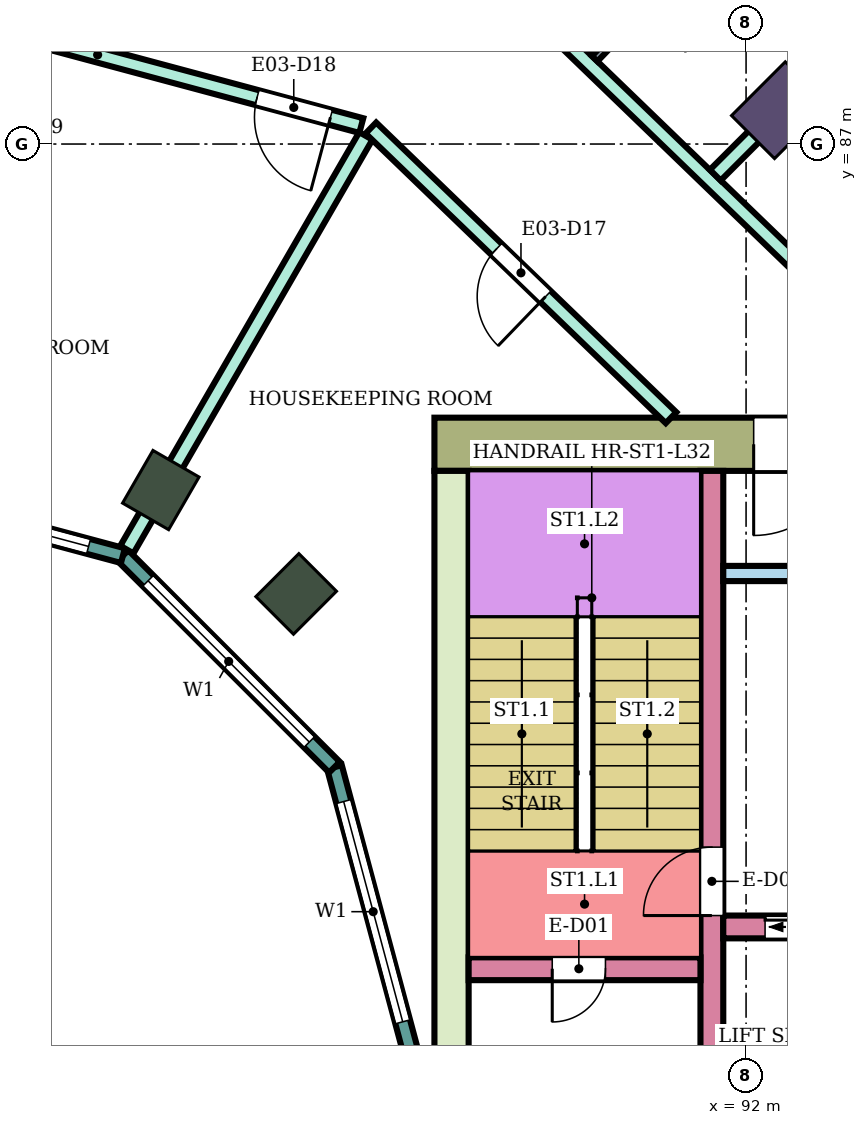
"""IFC4 building model, lengths in metres.
Left out: names, types, materials, properties, quantities, classifications, styles, units other than length and angle.
Written with IfcOpenShell. Run it as: python <this file> out.ifc"""

import sys

from ifc_helpers import new_model, si_unit, direction, frame, frame_2d, origin, origin_2d, place, context, subcontext, project, spatial, rectangle, extrude, element, fill, save


model = new_model("IFC4")
c1 = context("Model", 3, precision=1e-05, world=origin(), true_north=direction((0.0, 1.0)))
c2 = subcontext(c1, "Body", "Model", "MODEL_VIEW")
j1 = project(units=[si_unit("LENGTHUNIT", "METRE"), si_unit("PLANEANGLEUNIT", "RADIAN")], contexts=[c1])
p1 = place(None, origin())
s1 = spatial("IfcSite", under=j1, at=p1, CompositionType="ELEMENT")
p2 = place(p1, origin())
s2 = spatial("IfcBuilding", under=s1, at=p2, CompositionType="ELEMENT")
p3 = place(p2, frame((0.0, 0.0, 138.0)))
s3 = spatial("IfcBuildingStorey", under=s2, at=p3, CompositionType="ELEMENT", Elevation=138.0)
p4 = place(p3, frame((92.445, 87.445, 0.0), z_axis=(0.0, 0.0, 1.0), x_axis=(0.707106781187, 0.707106781187, 0.0)))
e1 = element("IfcColumn", 1, at=p4, inside=s3, PredefinedType="COLUMN", context=c2, shape_type="SweptSolid", body=[
    extrude(rectangle(XDim=1.0, YDim=0.8, at=origin_2d()), origin(), (0.0, 0.0, 1.0), 3.9),
])
for number, where, z_axis, x_axis in (
    (2, (86.081, 81.081, 0.0), (0.0, 0.0, 1.0), (0.707, 0.707, 0.0)),
    (3, (84.3, 82.448, 0.0), (0.0, 0.0, 1.0), (0.5, 0.866, 0.0)),
):
    element("IfcColumn", number, at=place(p3, frame(where, z_axis=z_axis, x_axis=x_axis)), inside=s3, PredefinedType="COLUMN", context=c2, shape_type="SweptSolid", body=[
        extrude(rectangle(XDim=0.8, YDim=0.7, at=origin_2d()), origin(), (0.0, 0.0, 1.0), 3.9),
    ])
p5 = place(p3, frame((87.9, 83.05, 0.0), z_axis=(0.0, 0.0, 1.0), x_axis=(1.0, 0.0, 0.0)))
e4 = element("IfcWall", 4, at=p5, inside=s3, PredefinedType="SHEAR", context=c2, shape_type="SweptSolid", body=[
    extrude(rectangle(XDim=14.8, YDim=0.7, at=frame_2d((7.4, 0.0))), origin(), (0.0, 0.0, 1.0), 3.58),
])
p6 = place(p5, frame((4.2, 0.0, 0.0)))
e5 = element("IfcOpeningElement", 5, at=p6, cuts=e4, PredefinedType="OPENING", context=c2, shape_type="SweptSolid", body=[
    extrude(rectangle(XDim=2.4, YDim=2.4, at=frame_2d((1.2, 1.2))), frame((0.0, 0.36, 0.0), z_axis=(0.0, -1.0, 0.0), x_axis=(1.0, 0.0, 0.0)), (0.0, 0.0, 1.0), 0.72),
])
p7 = place(p3, frame((88.125, 75.0, 0.0), z_axis=(0.0, 0.0, 1.0), x_axis=(0.0, 1.0, 0.0)))
e6 = element("IfcWall", 6, at=p7, inside=s3, PredefinedType="SHEAR", context=c2, shape_type="SweptSolid", body=[
    extrude(rectangle(XDim=7.7, YDim=0.45, at=frame_2d((3.85, 0.0))), origin(), (0.0, 0.0, 1.0), 3.58),
])
p8 = place(p3, frame((91.55, 75.0, 0.0), z_axis=(0.0, 0.0, 1.0), x_axis=(0.0, 1.0, 0.0)))
e7 = element("IfcWall", 7, at=p8, inside=s3, PredefinedType="SHEAR", context=c2, shape_type="SweptSolid", body=[
    extrude(rectangle(XDim=7.7, YDim=0.3, at=frame_2d((3.85, 0.0))), origin(), (0.0, 0.0, 1.0), 3.58),
])
p9 = place(p8, frame((1.85, 0.0, 0.0)))
e8 = element("IfcOpeningElement", 8, at=p9, cuts=e7, PredefinedType="OPENING", context=c2, shape_type="SweptSolid", body=[
    extrude(rectangle(XDim=0.9, YDim=2.1, at=frame_2d((0.45, 1.05))), frame((0.0, 0.16, 0.0), z_axis=(0.0, -1.0, 0.0), x_axis=(1.0, 0.0, 0.0)), (0.0, 0.0, 1.0), 0.32),
])
p10 = place(p3, frame((88.35, 76.15, 0.0), z_axis=(0.0, 0.0, 1.0), x_axis=(1.0, 0.0, 0.0)))
e9 = element("IfcWall", 9, at=p10, inside=s3, PredefinedType="SHEAR", context=c2, shape_type="SweptSolid", body=[
    extrude(rectangle(XDim=3.05, YDim=0.3, at=frame_2d((1.525, 0.0))), origin(), (0.0, 0.0, 1.0), 3.58),
])
p11 = place(p10, frame((1.1, 0.0, 0.0)))
e10 = element("IfcOpeningElement", 10, at=p11, cuts=e9, PredefinedType="OPENING", context=c2, shape_type="SweptSolid", body=[
    extrude(rectangle(XDim=0.7, YDim=2.0, at=frame_2d((0.35, 1.0))), frame((0.0, 0.16, 0.0), z_axis=(0.0, -1.0, 0.0), x_axis=(1.0, 0.0, 0.0)), (0.0, 0.0, 1.0), 0.32),
])
p12 = place(p3, frame((91.7, 76.7, 0.0), z_axis=(0.0, 0.0, 1.0), x_axis=(1.0, 0.0, 0.0)))
e11 = element("IfcWall", 11, at=p12, inside=s3, PredefinedType="SHEAR", context=c2, shape_type="SweptSolid", body=[
    extrude(rectangle(XDim=11.0, YDim=0.3, at=frame_2d((5.5, 0.0))), origin(), (0.0, 0.0, 1.0), 3.58),
])
p13 = place(p12, frame((0.55, 0.0, 0.0)))
e12 = element("IfcOpeningElement", 12, at=p13, cuts=e11, PredefinedType="OPENING", context=c2, shape_type="SweptSolid", body=[
    extrude(rectangle(XDim=1.1, YDim=2.1, at=frame_2d((0.55, 1.05))), frame((0.0, 0.16, 0.0), z_axis=(0.0, -1.0, 0.0), x_axis=(1.0, 0.0, 0.0)), (0.0, 0.0, 1.0), 0.32),
])
p14 = place(p12, frame((8.1, 0.0, 0.0)))
e13 = element("IfcOpeningElement", 13, at=p14, cuts=e11, PredefinedType="OPENING", context=c2, shape_type="SweptSolid", body=[
    extrude(rectangle(XDim=1.0, YDim=2.1, at=frame_2d((0.5, 1.05))), frame((0.0, 0.16, 0.0), z_axis=(0.0, -1.0, 0.0), x_axis=(1.0, 0.0, 0.0)), (0.0, 0.0, 1.0), 0.32),
])
p15 = place(p3, frame((91.7, 81.35, 0.0), z_axis=(0.0, 0.0, 1.0), x_axis=(1.0, 0.0, 0.0)))
e14 = element("IfcWall", 14, at=p15, inside=s3, PredefinedType="SHEAR", context=c2, shape_type="SweptSolid", body=[
    extrude(rectangle(XDim=4.5, YDim=0.2, at=frame_2d((2.25, 0.0))), origin(), (0.0, 0.0, 1.0), 3.58),
])
p16 = place(p3, frame((87.604, 75.0, 0.0), z_axis=(0.0, 0.0, 1.0), x_axis=(-0.258789828301, 0.965933654434, 0.0)))
e15 = element("IfcWall", 15, at=p16, inside=s3, PredefinedType="NOTDEFINED", context=c2, shape_type="SweptSolid", body=[
    extrude(rectangle(XDim=3.936, YDim=0.2, at=frame_2d((1.968, 0.0))), origin(), (0.0, 0.0, 1.0), 3.9),
])
p17 = place(p16, frame((0.468, 0.0, 0.9)))
e16 = element("IfcOpeningElement", 16, at=p17, cuts=e15, PredefinedType="OPENING", context=c2, shape_type="SweptSolid", body=[
    extrude(rectangle(XDim=3.0, YDim=2.3, at=frame_2d((1.5, 1.15))), frame((0.0, 0.11, 0.0), z_axis=(0.0, -1.0, 0.0), x_axis=(1.0, 0.0, 0.0)), (0.0, 0.0, 1.0), 0.22),
])
p18 = place(p3, frame((86.585, 78.802, 0.0), z_axis=(0.0, 0.0, 1.0), x_axis=(-0.707106781187, 0.707106781187, 0.0)))
e17 = element("IfcWall", 17, at=p18, inside=s3, PredefinedType="NOTDEFINED", context=c2, shape_type="SweptSolid", body=[
    extrude(rectangle(XDim=3.936, YDim=0.2, at=frame_2d((1.968, 0.0))), origin(), (0.0, 0.0, 1.0), 3.9),
])
p19 = place(p18, frame((0.468, 0.0, 0.9)))
e18 = element("IfcOpeningElement", 18, at=p19, cuts=e17, PredefinedType="OPENING", context=c2, shape_type="SweptSolid", body=[
    extrude(rectangle(XDim=3.0, YDim=2.3, at=frame_2d((1.5, 1.15))), frame((0.0, 0.11, 0.0), z_axis=(0.0, -1.0, 0.0), x_axis=(1.0, 0.0, 0.0)), (0.0, 0.0, 1.0), 0.22),
])
p20 = place(p3, frame((83.802, 81.585, 0.0), z_axis=(0.0, 0.0, 1.0), x_axis=(-0.965933654434, 0.258789828301, 0.0)))
e19 = element("IfcWall", 19, at=p20, inside=s3, PredefinedType="NOTDEFINED", context=c2, shape_type="SweptSolid", body=[
    extrude(rectangle(XDim=3.936, YDim=0.2, at=frame_2d((1.968, 0.0))), origin(), (0.0, 0.0, 1.0), 3.9),
])
p21 = place(p20, frame((0.468, 0.0, 0.9)))
e20 = element("IfcOpeningElement", 20, at=p21, cuts=e19, PredefinedType="OPENING", context=c2, shape_type="SweptSolid", body=[
    extrude(rectangle(XDim=3.0, YDim=2.3, at=frame_2d((1.5, 1.15))), frame((0.0, 0.11, 0.0), z_axis=(0.0, -1.0, 0.0), x_axis=(1.0, 0.0, 0.0)), (0.0, 0.0, 1.0), 0.22),
])
p22 = place(p3, frame((80.0, 89.104, 0.0), z_axis=(0.0, 0.0, 1.0), x_axis=(0.965854247166, -0.25908603442, 0.0)))
e21 = element("IfcWall", 21, at=p22, inside=s3, PredefinedType="PARTITIONING", context=c2, shape_type="SweptSolid", body=[
    extrude(rectangle(XDim=7.183, YDim=0.2, at=frame_2d((3.592, 0.0))), origin(), (0.0, 0.0, 1.0), 3.45),
])
p23 = place(p22, frame((5.763, 0.0, 0.0)))
e22 = element("IfcOpeningElement", 22, at=p23, cuts=e21, PredefinedType="OPENING", context=c2, shape_type="SweptSolid", body=[
    extrude(rectangle(XDim=1.0, YDim=2.1, at=frame_2d((0.5, 1.05))), frame((0.0, 0.11, 0.0), z_axis=(0.0, -1.0, 0.0), x_axis=(1.0, 0.0, 0.0)), (0.0, 0.0, 1.0), 0.22),
])
p24 = place(p3, frame((83.854, 81.665, 0.0), z_axis=(0.0, 0.0, 1.0), x_axis=(0.500241355856, 0.865886012066, 0.0)))
e23 = element("IfcWall", 23, at=p24, inside=s3, PredefinedType="PARTITIONING", context=c2, shape_type="SweptSolid", body=[
    extrude(rectangle(XDim=6.285, YDim=0.2, at=frame_2d((3.143, 0.0))), origin(), (0.0, 0.0, 1.0), 3.45),
])
p25 = place(p3, frame((87.064, 87.211, 0.0), z_axis=(0.0, 0.0, 1.0), x_axis=(0.719562412484, -0.694427774891, 0.0)))
e24 = element("IfcWall", 24, at=p25, inside=s3, PredefinedType="PARTITIONING", context=c2, shape_type="SweptSolid", body=[
    extrude(rectangle(XDim=5.488, YDim=0.2, at=frame_2d((2.744, 0.0))), origin(), (0.0, 0.0, 1.0), 3.45),
])
p26 = place(p25, frame((2.294, 0.0, 0.0)))
e25 = element("IfcOpeningElement", 25, at=p26, cuts=e24, PredefinedType="OPENING", context=c2, shape_type="SweptSolid", body=[
    extrude(rectangle(XDim=0.9, YDim=2.1, at=frame_2d((0.45, 1.05))), frame((0.0, 0.11, 0.0), z_axis=(0.0, -1.0, 0.0), x_axis=(1.0, 0.0, 0.0)), (0.0, 0.0, 1.0), 0.22),
])
p27 = place(p3, frame((88.386, 89.549, 0.0), z_axis=(0.0, 0.0, 1.0), x_axis=(0.719507339337, -0.694484836869, 0.0)))
e26 = element("IfcWall", 26, at=p27, inside=s3, PredefinedType="PARTITIONING", context=c2, shape_type="SweptSolid", body=[
    extrude(rectangle(XDim=6.635, YDim=0.2, at=frame_2d((3.317, 0.0))), origin(), (0.0, 0.0, 1.0), 3.45),
])
p28 = place(p3, frame((91.595, 86.591, 0.0), z_axis=(0.0, 0.0, 1.0), x_axis=(0.707214399597, 0.706999146394, 0.0)))
e27 = element("IfcWall", 27, at=p28, inside=s3, PredefinedType="PARTITIONING", context=c2, shape_type="SweptSolid", body=[
    extrude(rectangle(XDim=6.805, YDim=0.2, at=frame_2d((3.403, 0.0))), origin(), (0.0, 0.0, 1.0), 3.45),
])
p29 = place(p3, frame((90.008, 88.123, 0.0), z_axis=(0.0, 0.0, 1.0), x_axis=(0.694372521817, 0.719615731447, 0.0)))
e28 = element("IfcWall", 28, at=p29, inside=s3, PredefinedType="PARTITIONING", context=c2, shape_type="SweptSolid", body=[
    extrude(rectangle(XDim=2.65, YDim=0.1, at=frame_2d((1.325, 0.0))), origin(), (0.0, 0.0, 1.0), 3.45),
])
p30 = place(p29, frame((0.9, 0.0, 0.0)))
e29 = element("IfcOpeningElement", 29, at=p30, cuts=e28, PredefinedType="OPENING", context=c2, shape_type="SweptSolid", body=[
    extrude(rectangle(XDim=0.8, YDim=2.1, at=frame_2d((0.4, 1.05))), frame((0.0, 0.06, 0.0), z_axis=(0.0, -1.0, 0.0), x_axis=(1.0, 0.0, 0.0)), (0.0, 0.0, 1.0), 0.12),
])
p31 = place(p3, frame((91.883, 90.066, 0.0), z_axis=(0.0, 0.0, 1.0), x_axis=(0.719460839421, -0.694533008963, 0.0)))
e30 = element("IfcWall", 30, at=p31, inside=s3, PredefinedType="PARTITIONING", context=c2, shape_type="SweptSolid", body=[
    extrude(rectangle(XDim=4.25, YDim=0.1, at=frame_2d((2.125, 0.0))), origin(), (0.0, 0.0, 1.0), 3.45),
])
p32 = place(p17, origin())
e31 = element("IfcWindow", 31, at=p32, inside=s3, PartitioningType="SINGLE_PANEL", PredefinedType="WINDOW", context=c2, shape_type="SweptSolid", body=[
    extrude(rectangle(XDim=3.0, YDim=2.3, at=frame_2d((1.5, 1.15))), frame((0.0, 0.03, 0.0), z_axis=(0.0, -1.0, 0.0), x_axis=(1.0, 0.0, 0.0)), (0.0, 0.0, 1.0), 0.06),
])
fill(e16, e31)
p33 = place(p19, origin())
e32 = element("IfcWindow", 32, at=p33, inside=s3, PartitioningType="SINGLE_PANEL", PredefinedType="WINDOW", context=c2, shape_type="SweptSolid", body=[
    extrude(rectangle(XDim=3.0, YDim=2.3, at=frame_2d((1.5, 1.15))), frame((0.0, 0.03, 0.0), z_axis=(0.0, -1.0, 0.0), x_axis=(1.0, 0.0, 0.0)), (0.0, 0.0, 1.0), 0.06),
])
fill(e18, e32)
p34 = place(p21, origin())
e33 = element("IfcWindow", 33, at=p34, inside=s3, PartitioningType="SINGLE_PANEL", PredefinedType="WINDOW", context=c2, shape_type="SweptSolid", body=[
    extrude(rectangle(XDim=3.0, YDim=2.3, at=frame_2d((1.5, 1.15))), frame((0.0, 0.03, 0.0), z_axis=(0.0, -1.0, 0.0), x_axis=(1.0, 0.0, 0.0)), (0.0, 0.0, 1.0), 0.06),
])
fill(e20, e33)
p35 = place(p26, frame((0.9, 0.0, 0.0), z_axis=(0.0, 0.0, 1.0), x_axis=(-1.0, 0.0, 0.0)))
e34 = element("IfcDoor", 34, at=p35, inside=s3, OperationType="SINGLE_SWING_LEFT", PredefinedType="DOOR", context=c2, shape_type="SweptSolid", body=[
    extrude(rectangle(XDim=0.9, YDim=2.1, at=frame_2d((0.45, 1.05))), frame((0.0, 0.025, 0.0), z_axis=(0.0, -1.0, 0.0), x_axis=(1.0, 0.0, 0.0)), (0.0, 0.0, 1.0), 0.05),
])
fill(e25, e34)
p36 = place(p23, frame((1.0, 0.0, 0.0), z_axis=(0.0, 0.0, 1.0), x_axis=(-1.0, 0.0, 0.0)))
e35 = element("IfcDoor", 35, at=p36, inside=s3, OperationType="SINGLE_SWING_LEFT", PredefinedType="DOOR", context=c2, shape_type="SweptSolid", body=[
    extrude(rectangle(XDim=1.0, YDim=2.1, at=frame_2d((0.5, 1.05))), frame((0.0, 0.025, 0.0), z_axis=(0.0, -1.0, 0.0), x_axis=(1.0, 0.0, 0.0)), (0.0, 0.0, 1.0), 0.05),
])
fill(e22, e35)
p37 = place(p11, frame((0.7, 0.0, 0.0), z_axis=(0.0, 0.0, 1.0), x_axis=(-1.0, 0.0, 0.0)))
e36 = element("IfcDoor", 36, at=p37, inside=s3, OperationType="SINGLE_SWING_RIGHT", PredefinedType="DOOR", context=c2, shape_type="SweptSolid", body=[
    extrude(rectangle(XDim=0.7, YDim=2.0, at=frame_2d((0.35, 1.0))), frame((0.0, 0.025, 0.0), z_axis=(0.0, -1.0, 0.0), x_axis=(1.0, 0.0, 0.0)), (0.0, 0.0, 1.0), 0.05),
])
fill(e10, e36)
p38 = place(p9, origin())
e37 = element("IfcDoor", 37, at=p38, inside=s3, OperationType="SINGLE_SWING_LEFT", PredefinedType="DOOR", context=c2, shape_type="SweptSolid", body=[
    extrude(rectangle(XDim=0.9, YDim=2.1, at=frame_2d((0.45, 1.05))), frame((0.0, 0.025, 0.0), z_axis=(0.0, -1.0, 0.0), x_axis=(1.0, 0.0, 0.0)), (0.0, 0.0, 1.0), 0.05),
])
fill(e8, e37)
p39 = place(p13, origin())
e38 = element("IfcDoor", 38, at=p39, inside=s3, OperationType="DOUBLE_DOOR_SLIDING", PredefinedType="DOOR", context=c2, shape_type="SweptSolid", body=[
    extrude(rectangle(XDim=1.1, YDim=2.1, at=frame_2d((0.55, 1.05))), frame((0.0, 0.025, 0.0), z_axis=(0.0, -1.0, 0.0), x_axis=(1.0, 0.0, 0.0)), (0.0, 0.0, 1.0), 0.05),
])
fill(e12, e38)
p40 = place(p6, frame((2.4, 0.0, 0.0), z_axis=(0.0, 0.0, 1.0), x_axis=(-1.0, 0.0, 0.0)))
e39 = element("IfcDoor", 39, at=p40, inside=s3, OperationType="DOUBLE_DOOR_SINGLE_SWING", PredefinedType="DOOR", context=c2, shape_type="SweptSolid", body=[
    extrude(rectangle(XDim=2.4, YDim=2.4, at=frame_2d((1.2, 1.2))), frame((0.0, 0.025, 0.0), z_axis=(0.0, -1.0, 0.0), x_axis=(1.0, 0.0, 0.0)), (0.0, 0.0, 1.0), 0.05),
])
fill(e5, e39)
save(model, sys.argv[1])
